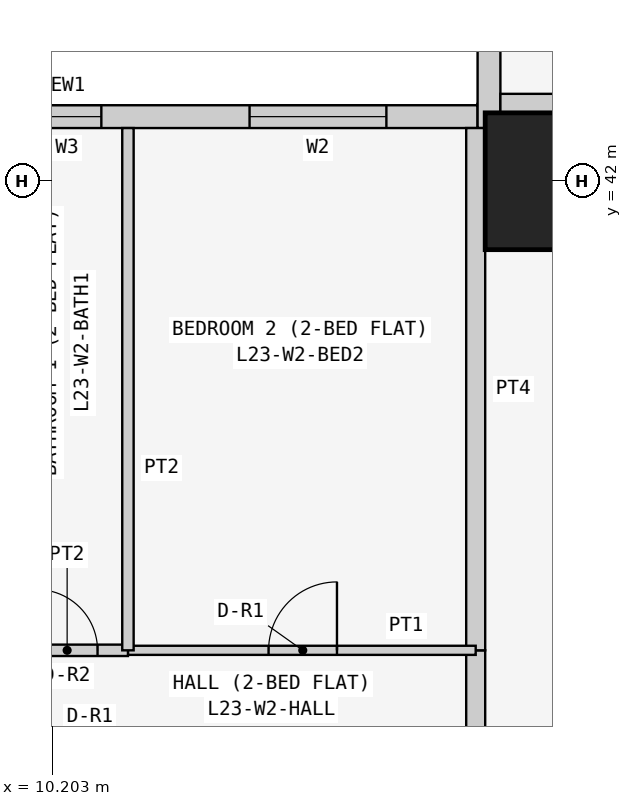
"""IFC4 building model, lengths in metres.
Left out: names, types, materials, properties, quantities, classifications, styles, units other than length and angle.
Written with IfcOpenShell. Run it as: python <this file> out.ifc"""

import sys

from ifc_helpers import new_model, si_unit, direction, frame, frame_2d, origin, origin_2d, place, context, subcontext, project, spatial, rectangle, extrude, element, fill, save


model = new_model("IFC4")
c1 = context("Model", 3, precision=1e-05, world=origin(), true_north=direction((0.0, 1.0)))
c2 = subcontext(c1, "Body", "Model", "MODEL_VIEW")
j1 = project(units=[si_unit("LENGTHUNIT", "METRE"), si_unit("PLANEANGLEUNIT", "RADIAN")], contexts=[c1])
p1 = place(None, origin())
s1 = spatial("IfcSite", under=j1, at=p1, CompositionType="ELEMENT")
p2 = place(p1, origin())
s2 = spatial("IfcBuilding", under=s1, at=p2, CompositionType="ELEMENT")
p3 = place(p2, frame((0.0, 0.0, 92.1)))
s3 = spatial("IfcBuildingStorey", under=s2, at=p3, CompositionType="ELEMENT", Elevation=92.1)
p4 = place(p3, frame((16.8, 42.0, 0.0), z_axis=(0.0, 0.0, 1.0), x_axis=(1.0, 0.0, 0.0)))
e1 = element("IfcColumn", 1, at=p4, inside=s3, PredefinedType="COLUMN", context=c2, shape_type="SweptSolid", body=[
    extrude(rectangle(XDim=1.8, YDim=1.8, at=origin_2d()), origin(), (0.0, 0.0, 1.0), 3.6),
])
p5 = place(p3, frame((15.8, 42.85, 0.0), z_axis=(0.0, 0.0, 1.0), x_axis=(-1.0, 0.0, 0.0)))
e2 = element("IfcWall", 2, at=p5, inside=s3, PredefinedType="SOLIDWALL", context=c2, shape_type="SweptSolid", body=[
    extrude(rectangle(XDim=15.4, YDim=0.3, at=frame_2d((7.7, 0.0))), origin(), (0.0, 0.0, 1.0), 3.45),
])
p6 = place(p5, frame((1.2, 0.0, 0.9)))
e3 = element("IfcOpeningElement", 3, at=p6, cuts=e2, PredefinedType="OPENING", context=c2, shape_type="SweptSolid", body=[
    extrude(rectangle(XDim=1.8, YDim=1.5, at=frame_2d((0.9, 0.75))), frame((0.0, 0.16, 0.0), z_axis=(0.0, -1.0, 0.0), x_axis=(1.0, 0.0, 0.0)), (0.0, 0.0, 1.0), 0.32),
])
p7 = place(p5, frame((4.95, 0.0, 1.5)))
e4 = element("IfcOpeningElement", 4, at=p7, cuts=e2, PredefinedType="OPENING", context=c2, shape_type="SweptSolid", body=[
    extrude(rectangle(XDim=0.9, YDim=0.7, at=frame_2d((0.45, 0.35))), frame((0.0, 0.16, 0.0), z_axis=(0.0, -1.0, 0.0), x_axis=(1.0, 0.0, 0.0)), (0.0, 0.0, 1.0), 0.32),
])
p8 = place(p5, frame((8.5, 0.0, 0.9)))
e5 = element("IfcOpeningElement", 5, at=p8, cuts=e2, PredefinedType="OPENING", context=c2, shape_type="SweptSolid", body=[
    extrude(rectangle(XDim=1.8, YDim=1.5, at=frame_2d((0.9, 0.75))), frame((0.0, 0.16, 0.0), z_axis=(0.0, -1.0, 0.0), x_axis=(1.0, 0.0, 0.0)), (0.0, 0.0, 1.0), 0.32),
])
p9 = place(p5, frame((12.5, 0.0, 0.0)))
e6 = element("IfcOpeningElement", 6, at=p9, cuts=e2, PredefinedType="OPENING", context=c2, shape_type="SweptSolid", body=[
    extrude(rectangle(XDim=0.9, YDim=2.4, at=frame_2d((0.45, 1.2))), frame((0.0, 0.16, 0.0), z_axis=(0.0, -1.0, 0.0), x_axis=(1.0, 0.0, 0.0)), (0.0, 0.0, 1.0), 0.32),
])
p10 = place(p5, frame((13.5, 0.0, 0.9)))
e7 = element("IfcOpeningElement", 7, at=p10, cuts=e2, PredefinedType="OPENING", context=c2, shape_type="SweptSolid", body=[
    extrude(rectangle(XDim=1.2, YDim=1.5, at=frame_2d((0.6, 0.75))), frame((0.0, 0.16, 0.0), z_axis=(0.0, -1.0, 0.0), x_axis=(1.0, 0.0, 0.0)), (0.0, 0.0, 1.0), 0.32),
])
p11 = place(p3, frame((15.95, 58.4, 0.0), z_axis=(0.0, 0.0, 1.0), x_axis=(0.0, -1.0, 0.0)))
e8 = element("IfcWall", 8, at=p11, inside=s3, PredefinedType="SOLIDWALL", context=c2, shape_type="SweptSolid", body=[
    extrude(rectangle(XDim=15.7, YDim=0.3, at=frame_2d((7.85, 0.0))), origin(), (0.0, 0.0, 1.0), 3.45),
])
p12 = place(p11, frame((12.4, 0.0, 0.9)))
e9 = element("IfcOpeningElement", 9, at=p12, cuts=e8, PredefinedType="OPENING", context=c2, shape_type="SweptSolid", body=[
    extrude(rectangle(XDim=1.8, YDim=1.5, at=frame_2d((0.9, 0.75))), frame((0.0, 0.16, 0.0), z_axis=(0.0, -1.0, 0.0), x_axis=(1.0, 0.0, 0.0)), (0.0, 0.0, 1.0), 0.32),
])
p13 = place(p11, frame((9.55, 0.0, 1.5)))
e10 = element("IfcOpeningElement", 10, at=p13, cuts=e8, PredefinedType="OPENING", context=c2, shape_type="SweptSolid", body=[
    extrude(rectangle(XDim=0.9, YDim=0.7, at=frame_2d((0.45, 0.35))), frame((0.0, 0.16, 0.0), z_axis=(0.0, -1.0, 0.0), x_axis=(1.0, 0.0, 0.0)), (0.0, 0.0, 1.0), 0.32),
])
p14 = place(p11, frame((5.1, 0.0, 0.9)))
e11 = element("IfcOpeningElement", 11, at=p14, cuts=e8, PredefinedType="OPENING", context=c2, shape_type="SweptSolid", body=[
    extrude(rectangle(XDim=1.8, YDim=1.5, at=frame_2d((0.9, 0.75))), frame((0.0, 0.16, 0.0), z_axis=(0.0, -1.0, 0.0), x_axis=(1.0, 0.0, 0.0)), (0.0, 0.0, 1.0), 0.32),
])
p15 = place(p11, frame((2.0, 0.0, 0.0)))
e12 = element("IfcOpeningElement", 12, at=p15, cuts=e8, PredefinedType="OPENING", context=c2, shape_type="SweptSolid", body=[
    extrude(rectangle(XDim=0.9, YDim=2.4, at=frame_2d((0.45, 1.2))), frame((0.0, 0.16, 0.0), z_axis=(0.0, -1.0, 0.0), x_axis=(1.0, 0.0, 0.0)), (0.0, 0.0, 1.0), 0.32),
])
p16 = place(p11, frame((0.7, 0.0, 0.9)))
e13 = element("IfcOpeningElement", 13, at=p16, cuts=e8, PredefinedType="OPENING", context=c2, shape_type="SweptSolid", body=[
    extrude(rectangle(XDim=1.2, YDim=1.5, at=frame_2d((0.6, 0.75))), frame((0.0, 0.16, 0.0), z_axis=(0.0, -1.0, 0.0), x_axis=(1.0, 0.0, 0.0)), (0.0, 0.0, 1.0), 0.32),
])
p17 = place(p3, frame((16.1, 43.025, 0.0), z_axis=(0.0, 0.0, 1.0), x_axis=(1.0, 0.0, 0.0)))
e14 = element("IfcWall", 14, at=p17, inside=s3, PredefinedType="PARTITIONING", context=c2, shape_type="SweptSolid", body=[
    extrude(rectangle(XDim=6.471, YDim=0.25, at=frame_2d((3.235, 0.0))), origin(), (0.0, 0.0, 1.0), 3.45),
])
p18 = place(p3, frame((15.775, 34.629, 0.0), z_axis=(0.0, 0.0, 1.0), x_axis=(0.0, 1.0, 0.0)))
e15 = element("IfcWall", 15, at=p18, inside=s3, PredefinedType="PARTITIONING", context=c2, shape_type="SweptSolid", body=[
    extrude(rectangle(XDim=1.2, YDim=0.25, at=frame_2d((0.6, 0.0))), origin(), (0.0, 0.0, 1.0), 3.45),
])
p19 = place(p3, frame((15.775, 35.829, 0.0), z_axis=(0.0, 0.0, 1.0), x_axis=(0.0, 1.0, 0.0)))
e16 = element("IfcWall", 16, at=p19, inside=s3, PredefinedType="PARTITIONING", context=c2, shape_type="SweptSolid", body=[
    extrude(rectangle(XDim=6.871, YDim=0.25, at=frame_2d((3.436, 0.0))), origin(), (0.0, 0.0, 1.0), 3.45),
])
p20 = place(p3, frame((11.2, 35.829, 0.0), z_axis=(0.0, 0.0, 1.0), x_axis=(1.0, 0.0, 0.0)))
e17 = element("IfcWall", 17, at=p20, inside=s3, PredefinedType="PARTITIONING", context=c2, shape_type="SweptSolid", body=[
    extrude(rectangle(XDim=4.575, YDim=0.12, at=frame_2d((2.288, 0.0))), origin(), (0.0, 0.0, 1.0), 3.45),
])
p21 = place(p20, frame((1.85, 0.0, 0.0)))
e18 = element("IfcOpeningElement", 18, at=p21, cuts=e17, PredefinedType="OPENING", context=c2, shape_type="SweptSolid", body=[
    extrude(rectangle(XDim=0.9, YDim=2.1, at=frame_2d((0.45, 1.05))), frame((0.0, 0.07, 0.0), z_axis=(0.0, -1.0, 0.0), x_axis=(1.0, 0.0, 0.0)), (0.0, 0.0, 1.0), 0.14),
])
p22 = place(p3, frame((9.6, 35.829, 0.0), z_axis=(0.0, 0.0, 1.0), x_axis=(1.0, 0.0, 0.0)))
e19 = element("IfcWall", 19, at=p22, inside=s3, PredefinedType="PARTITIONING", context=c2, shape_type="SweptSolid", body=[
    extrude(rectangle(XDim=1.6, YDim=0.15, at=frame_2d((0.8, 0.0))), origin(), (0.0, 0.0, 1.0), 3.45),
])
p23 = place(p22, frame((0.4, 0.0, 0.0)))
e20 = element("IfcOpeningElement", 20, at=p23, cuts=e19, PredefinedType="OPENING", context=c2, shape_type="SweptSolid", body=[
    extrude(rectangle(XDim=0.8, YDim=2.1, at=frame_2d((0.4, 1.05))), frame((0.0, 0.085, 0.0), z_axis=(0.0, -1.0, 0.0), x_axis=(1.0, 0.0, 0.0)), (0.0, 0.0, 1.0), 0.17),
])
p24 = place(p3, frame((11.2, 35.829, 0.0), z_axis=(0.0, 0.0, 1.0), x_axis=(0.0, 1.0, 0.0)))
e21 = element("IfcWall", 21, at=p24, inside=s3, PredefinedType="PARTITIONING", context=c2, shape_type="SweptSolid", body=[
    extrude(rectangle(XDim=6.871, YDim=0.15, at=frame_2d((3.436, 0.0))), origin(), (0.0, 0.0, 1.0), 3.45),
])
p25 = place(p6, origin())
e22 = element("IfcWindow", 22, at=p25, inside=s3, PartitioningType="SINGLE_PANEL", PredefinedType="WINDOW", context=c2, shape_type="SweptSolid", body=[
    extrude(rectangle(XDim=1.8, YDim=1.5, at=frame_2d((0.9, 0.75))), frame((0.0, 0.03, 0.0), z_axis=(0.0, -1.0, 0.0), x_axis=(1.0, 0.0, 0.0)), (0.0, 0.0, 1.0), 0.06),
])
fill(e3, e22)
p26 = place(p7, origin())
e23 = element("IfcWindow", 23, at=p26, inside=s3, PartitioningType="SINGLE_PANEL", PredefinedType="WINDOW", context=c2, shape_type="SweptSolid", body=[
    extrude(rectangle(XDim=0.9, YDim=0.7, at=frame_2d((0.45, 0.35))), frame((0.0, 0.03, 0.0), z_axis=(0.0, -1.0, 0.0), x_axis=(1.0, 0.0, 0.0)), (0.0, 0.0, 1.0), 0.06),
])
fill(e4, e23)
p27 = place(p21, origin())
e24 = element("IfcDoor", 24, at=p27, inside=s3, OperationType="SINGLE_SWING_RIGHT", PredefinedType="DOOR", context=c2, shape_type="SweptSolid", body=[
    extrude(rectangle(XDim=0.9, YDim=2.1, at=frame_2d((0.45, 1.05))), frame((0.0, 0.025, 0.0), z_axis=(0.0, -1.0, 0.0), x_axis=(1.0, 0.0, 0.0)), (0.0, 0.0, 1.0), 0.05),
])
fill(e18, e24)
p28 = place(p23, origin())
e25 = element("IfcDoor", 25, at=p28, inside=s3, OperationType="SINGLE_SWING_LEFT", PredefinedType="DOOR", context=c2, shape_type="SweptSolid", body=[
    extrude(rectangle(XDim=0.8, YDim=2.1, at=frame_2d((0.4, 1.05))), frame((0.0, 0.025, 0.0), z_axis=(0.0, -1.0, 0.0), x_axis=(1.0, 0.0, 0.0)), (0.0, 0.0, 1.0), 0.05),
])
fill(e20, e25)
save(model, sys.argv[1])
